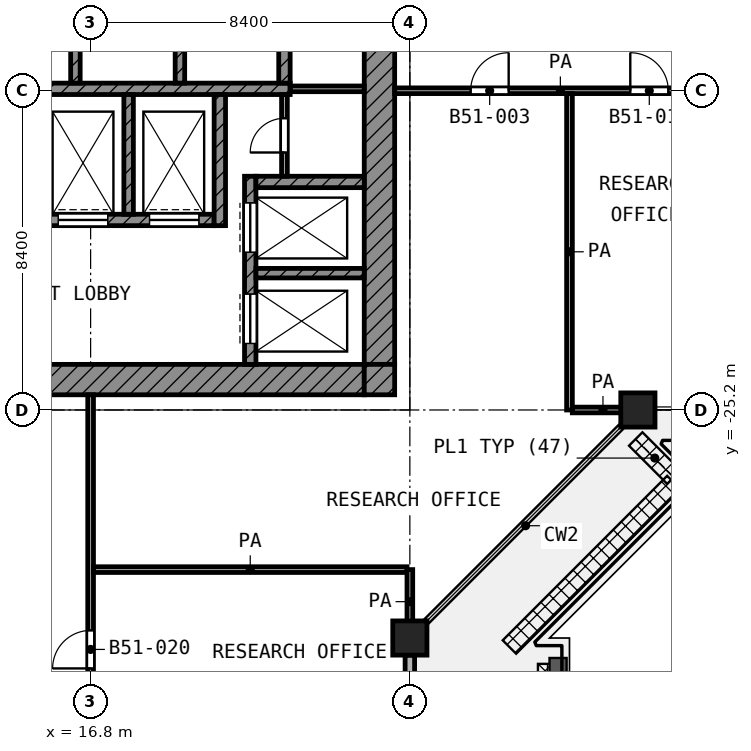
"""IFC4 building model, lengths in metres.
Left out: names, types, materials, properties, quantities, classifications, styles, units other than length and angle.
Written with IfcOpenShell. Run it as: python <this file> out.ifc"""

import sys

from ifc_helpers import new_model, si_unit, direction, frame, frame_2d, origin, origin_2d, place, context, subcontext, project, spatial, rectangle, extrude, element, fill, save


model = new_model("IFC4")
c1 = context("Model", 3, precision=1e-05, world=origin(), true_north=direction((0.0, 1.0)))
c2 = subcontext(c1, "Body", "Model", "MODEL_VIEW")
j1 = project(units=[si_unit("LENGTHUNIT", "METRE"), si_unit("PLANEANGLEUNIT", "RADIAN")], contexts=[c1])
p1 = place(None, origin())
s1 = spatial("IfcSite", under=j1, at=p1, CompositionType="ELEMENT")
p2 = place(p1, origin())
s2 = spatial("IfcBuilding", under=s1, at=p2, CompositionType="ELEMENT")
p3 = place(p2, frame((0.0, 0.0, 222.2)))
s3 = spatial("IfcBuildingStorey", under=s2, at=p3, CompositionType="ELEMENT", Elevation=222.2)
for number, where, z_axis, x_axis in (
    (1, (31.2, -25.2, 0.0), (0.0, 0.0, 1.0), (1.0, 0.0, 0.0)),
    (2, (25.2, -31.2, 0.0), (0.0, 0.0, 1.0), (1.0, 0.0, 0.0)),
):
    element("IfcColumn", number, at=place(p3, frame(where, z_axis=z_axis, x_axis=x_axis)), inside=s3, PredefinedType="COLUMN", context=c2, shape_type="SweptSolid", body=[
        extrude(rectangle(XDim=0.9, YDim=0.9, at=origin_2d()), origin(), (0.0, 0.0, 1.0), 4.2),
    ])
p4 = place(p3, frame((25.2, -35.725, 0.0), z_axis=(0.0, 0.0, 1.0), x_axis=(0.0, 1.0, 0.0)))
e3 = element("IfcWall", 3, at=p4, inside=s3, PredefinedType="SOLIDWALL", context=c2, shape_type="SweptSolid", body=[
    extrude(rectangle(XDim=4.075, YDim=0.25, at=frame_2d((2.038, 0.0))), origin(), (0.0, 0.0, 1.0), 2.58),
])
p5 = place(p4, frame((0.837, 0.0, 0.0)))
e4 = element("IfcOpeningElement", 4, at=p5, cuts=e3, PredefinedType="OPENING", context=c2, shape_type="SweptSolid", body=[
    extrude(rectangle(XDim=1.0, YDim=2.1, at=frame_2d((0.5, 1.05))), frame((0.0, 0.135, 0.0), z_axis=(0.0, -1.0, 0.0), x_axis=(1.0, 0.0, 0.0)), (0.0, 0.0, 1.0), 0.27),
])
p6 = place(p3, frame((24.4, -24.0, 0.0), z_axis=(0.0, 0.0, 1.0), x_axis=(0.0, 1.0, 0.0)))
e5 = element("IfcWall", 5, at=p6, inside=s3, PredefinedType="SHEAR", context=c2, shape_type="SweptSolid", body=[
    extrude(rectangle(XDim=18.6, YDim=0.8, at=frame_2d((9.3, 0.0))), origin(), (0.0, 0.0, 1.0), 3.6),
])
p7 = place(p6, frame((10.5, 0.0, 0.0)))
e6 = element("IfcOpeningElement", 6, at=p7, cuts=e5, PredefinedType="OPENING", context=c2, shape_type="SweptSolid", body=[
    extrude(rectangle(XDim=1.8, YDim=2.1, at=frame_2d((0.9, 1.05))), frame((0.0, 0.41, 0.0), z_axis=(0.0, -1.0, 0.0), x_axis=(1.0, 0.0, 0.0)), (0.0, 0.0, 1.0), 0.82),
])
p8 = place(p3, frame((5.4, -24.4, 0.0), z_axis=(0.0, 0.0, 1.0), x_axis=(1.0, 0.0, 0.0)))
e7 = element("IfcWall", 7, at=p8, inside=s3, PredefinedType="SHEAR", context=c2, shape_type="SweptSolid", body=[
    extrude(rectangle(XDim=18.6, YDim=0.8, at=frame_2d((9.3, 0.0))), origin(), (0.0, 0.0, 1.0), 3.6),
])
p9 = place(p8, frame((6.3, 0.0, 0.0)))
e8 = element("IfcOpeningElement", 8, at=p9, cuts=e7, PredefinedType="OPENING", context=c2, shape_type="SweptSolid", body=[
    extrude(rectangle(XDim=1.8, YDim=2.1, at=frame_2d((0.9, 1.05))), frame((0.0, 0.41, 0.0), z_axis=(0.0, -1.0, 0.0), x_axis=(1.0, 0.0, 0.0)), (0.0, 0.0, 1.0), 0.82),
])
p10 = place(p3, frame((24.4, -24.8, 0.0), z_axis=(0.0, 0.0, 1.0), x_axis=(0.0, 1.0, 0.0)))
e9 = element("IfcWall", 9, at=p10, inside=s3, PredefinedType="SHEAR", context=c2, shape_type="SweptSolid", body=[
    extrude(rectangle(XDim=0.8, YDim=0.8, at=frame_2d((0.4, 0.0))), origin(), (0.0, 0.0, 1.0), 3.6),
])
p11 = place(p3, frame((5.4, -16.75, 0.0), z_axis=(0.0, 0.0, 1.0), x_axis=(1.0, 0.0, 0.0)))
e10 = element("IfcWall", 10, at=p11, inside=s3, PredefinedType="SHEAR", context=c2, shape_type="SweptSolid", body=[
    extrude(rectangle(XDim=16.65, YDim=0.3, at=frame_2d((8.325, 0.0))), origin(), (0.0, 0.0, 1.0), 3.6),
])
p12 = place(p3, frame((5.4, -20.2, 0.0), z_axis=(0.0, 0.0, 1.0), x_axis=(1.0, 0.0, 0.0)))
e11 = element("IfcWall", 11, at=p12, inside=s3, PredefinedType="SHEAR", context=c2, shape_type="SweptSolid", body=[
    extrude(rectangle(XDim=14.65, YDim=0.3, at=frame_2d((7.325, 0.0))), origin(), (0.0, 0.0, 1.0), 3.6),
])
p13 = place(p12, frame((10.55, 0.0, 0.0)))
e12 = element("IfcOpeningElement", 12, at=p13, cuts=e11, PredefinedType="OPENING", context=c2, shape_type="SweptSolid", body=[
    extrude(rectangle(XDim=1.3, YDim=2.1, at=frame_2d((0.65, 1.05))), frame((0.0, 0.16, 0.0), z_axis=(0.0, -1.0, 0.0), x_axis=(1.0, 0.0, 0.0)), (0.0, 0.0, 1.0), 0.32),
])
p14 = place(p12, frame((12.95, 0.0, 0.0)))
e13 = element("IfcOpeningElement", 13, at=p14, cuts=e11, PredefinedType="OPENING", context=c2, shape_type="SweptSolid", body=[
    extrude(rectangle(XDim=1.3, YDim=2.1, at=frame_2d((0.65, 1.05))), frame((0.0, 0.16, 0.0), z_axis=(0.0, -1.0, 0.0), x_axis=(1.0, 0.0, 0.0)), (0.0, 0.0, 1.0), 0.32),
])
p15 = place(p12, frame((0.55, 0.0, 0.0)))
e14 = element("IfcOpeningElement", 14, at=p15, cuts=e11, PredefinedType="OPENING", context=c2, shape_type="SweptSolid", body=[
    extrude(rectangle(XDim=1.3, YDim=2.1, at=frame_2d((0.65, 1.05))), frame((0.0, 0.16, 0.0), z_axis=(0.0, -1.0, 0.0), x_axis=(1.0, 0.0, 0.0)), (0.0, 0.0, 1.0), 0.32),
])
p16 = place(p12, frame((2.95, 0.0, 0.0)))
e15 = element("IfcOpeningElement", 15, at=p16, cuts=e11, PredefinedType="OPENING", context=c2, shape_type="SweptSolid", body=[
    extrude(rectangle(XDim=1.3, YDim=2.1, at=frame_2d((0.65, 1.05))), frame((0.0, 0.16, 0.0), z_axis=(0.0, -1.0, 0.0), x_axis=(1.0, 0.0, 0.0)), (0.0, 0.0, 1.0), 0.32),
])
p17 = place(p12, frame((6.55, 0.0, 0.0)))
e16 = element("IfcOpeningElement", 16, at=p17, cuts=e11, PredefinedType="OPENING", context=c2, shape_type="SweptSolid", body=[
    extrude(rectangle(XDim=0.9, YDim=2.1, at=frame_2d((0.45, 1.05))), frame((0.0, 0.16, 0.0), z_axis=(0.0, -1.0, 0.0), x_axis=(1.0, 0.0, 0.0)), (0.0, 0.0, 1.0), 0.32),
])
p18 = place(p12, frame((8.95, 0.0, 0.0)))
e17 = element("IfcOpeningElement", 17, at=p18, cuts=e11, PredefinedType="OPENING", context=c2, shape_type="SweptSolid", body=[
    extrude(rectangle(XDim=0.9, YDim=2.1, at=frame_2d((0.45, 1.05))), frame((0.0, 0.16, 0.0), z_axis=(0.0, -1.0, 0.0), x_axis=(1.0, 0.0, 0.0)), (0.0, 0.0, 1.0), 0.32),
])
p19 = place(p3, frame((20.2, -20.35, 0.0), z_axis=(0.0, 0.0, 1.0), x_axis=(0.0, 1.0, 0.0)))
e18 = element("IfcWall", 18, at=p19, inside=s3, PredefinedType="SHEAR", context=c2, shape_type="SweptSolid", body=[
    extrude(rectangle(XDim=3.45, YDim=0.3, at=frame_2d((1.725, 0.0))), origin(), (0.0, 0.0, 1.0), 3.6),
])
p20 = place(p3, frame((21.9, -16.6, 0.0), z_axis=(0.0, 0.0, 1.0), x_axis=(0.0, 1.0, 0.0)))
e19 = element("IfcWall", 19, at=p20, inside=s3, PredefinedType="SHEAR", context=c2, shape_type="SweptSolid", body=[
    extrude(rectangle(XDim=2.35, YDim=0.3, at=frame_2d((1.175, 0.0))), origin(), (0.0, 0.0, 1.0), 3.6),
])
p21 = place(p3, frame((21.15, -19.2, 0.0), z_axis=(0.0, 0.0, 1.0), x_axis=(1.0, 0.0, 0.0)))
e20 = element("IfcWall", 20, at=p21, inside=s3, PredefinedType="SHEAR", context=c2, shape_type="SweptSolid", body=[
    extrude(rectangle(XDim=2.85, YDim=0.3, at=frame_2d((1.425, 0.0))), origin(), (0.0, 0.0, 1.0), 3.6),
])
p22 = place(p3, frame((21.0, -24.0, 0.0), z_axis=(0.0, 0.0, 1.0), x_axis=(0.0, 1.0, 0.0)))
e21 = element("IfcWall", 21, at=p22, inside=s3, PredefinedType="SHEAR", context=c2, shape_type="SweptSolid", body=[
    extrude(rectangle(XDim=4.95, YDim=0.3, at=frame_2d((2.475, 0.0))), origin(), (0.0, 0.0, 1.0), 3.6),
])
p23 = place(p22, frame((2.95, 0.0, 0.0)))
e22 = element("IfcOpeningElement", 22, at=p23, cuts=e21, PredefinedType="OPENING", context=c2, shape_type="SweptSolid", body=[
    extrude(rectangle(XDim=1.3, YDim=2.1, at=frame_2d((0.65, 1.05))), frame((0.0, 0.16, 0.0), z_axis=(0.0, -1.0, 0.0), x_axis=(1.0, 0.0, 0.0)), (0.0, 0.0, 1.0), 0.32),
])
p24 = place(p22, frame((0.55, 0.0, 0.0)))
e23 = element("IfcOpeningElement", 23, at=p24, cuts=e21, PredefinedType="OPENING", context=c2, shape_type="SweptSolid", body=[
    extrude(rectangle(XDim=1.3, YDim=2.1, at=frame_2d((0.65, 1.05))), frame((0.0, 0.16, 0.0), z_axis=(0.0, -1.0, 0.0), x_axis=(1.0, 0.0, 0.0)), (0.0, 0.0, 1.0), 0.32),
])
p25 = place(p3, frame((21.15, -21.6, 0.0), z_axis=(0.0, 0.0, 1.0), x_axis=(1.0, 0.0, 0.0)))
e24 = element("IfcWall", 24, at=p25, inside=s3, PredefinedType="SHEAR", context=c2, shape_type="SweptSolid", body=[
    extrude(rectangle(XDim=2.85, YDim=0.25, at=frame_2d((1.425, 0.0))), origin(), (0.0, 0.0, 1.0), 3.6),
])
p26 = place(p3, frame((17.8, -20.05, 0.0), z_axis=(0.0, 0.0, 1.0), x_axis=(0.0, 1.0, 0.0)))
e25 = element("IfcWall", 25, at=p26, inside=s3, PredefinedType="SHEAR", context=c2, shape_type="SweptSolid", body=[
    extrude(rectangle(XDim=3.15, YDim=0.25, at=frame_2d((1.575, 0.0))), origin(), (0.0, 0.0, 1.0), 3.6),
])
for number, where, z_axis, x_axis in (
    (26, (16.4, -16.6, 0.0), (0.0, 0.0, 1.0), (0.0, 1.0, 0.0)),
    (27, (19.15, -16.6, 0.0), (0.0, 0.0, 1.0), (0.0, 1.0, 0.0)),
):
    element("IfcWall", number, at=place(p3, frame(where, z_axis=z_axis, x_axis=x_axis)), inside=s3, PredefinedType="SHEAR", context=c2, shape_type="SweptSolid", body=[
        extrude(rectangle(XDim=2.35, YDim=0.25, at=frame_2d((1.175, 0.0))), origin(), (0.0, 0.0, 1.0), 3.6),
    ])
p27 = place(p3, frame((21.9, -19.05, 0.0), z_axis=(0.0, 0.0, 1.0), x_axis=(0.0, 1.0, 0.0)))
e28 = element("IfcWall", 28, at=p27, inside=s3, PredefinedType="PARTITIONING", context=c2, shape_type="SweptSolid", body=[
    extrude(rectangle(XDim=2.15, YDim=0.15, at=frame_2d((1.075, 0.0))), origin(), (0.0, 0.0, 1.0), 3.6),
])
p28 = place(p27, frame((0.625, 0.0, 0.0)))
e29 = element("IfcOpeningElement", 29, at=p28, cuts=e28, PredefinedType="OPENING", context=c2, shape_type="SweptSolid", body=[
    extrude(rectangle(XDim=0.9, YDim=2.1, at=frame_2d((0.45, 1.05))), frame((0.0, 0.085, 0.0), z_axis=(0.0, -1.0, 0.0), x_axis=(1.0, 0.0, 0.0)), (0.0, 0.0, 1.0), 0.17),
])
p29 = place(p3, frame((22.05, -16.75, 0.0), z_axis=(0.0, 0.0, 1.0), x_axis=(1.0, 0.0, 0.0)))
e30 = element("IfcWall", 30, at=p29, inside=s3, PredefinedType="PARTITIONING", context=c2, shape_type="SweptSolid", body=[
    extrude(rectangle(XDim=1.95, YDim=0.15, at=frame_2d((0.975, 0.0))), origin(), (0.0, 0.0, 1.0), 3.6),
])
p30 = place(p3, frame((16.875, -29.4, 0.0), z_axis=(0.0, 0.0, 1.0), x_axis=(1.0, 0.0, 0.0)))
e31 = element("IfcWall", 31, at=p30, inside=s3, PredefinedType="PARTITIONING", context=c2, shape_type="SweptSolid", body=[
    extrude(rectangle(XDim=8.25, YDim=0.15, at=frame_2d((4.125, 0.0))), origin(), (0.0, 0.0, 1.0), 3.6),
])
p31 = place(p3, frame((29.475, -25.2, 0.0), z_axis=(0.0, 0.0, 1.0), x_axis=(1.0, 0.0, 0.0)))
e32 = element("IfcWall", 32, at=p31, inside=s3, PredefinedType="PARTITIONING", context=c2, shape_type="SweptSolid", body=[
    extrude(rectangle(XDim=1.612, YDim=0.15, at=frame_2d((0.806, 0.0))), origin(), (0.0, 0.0, 1.0), 3.6),
])
p32 = place(p3, frame((24.8, -16.8, 0.0), z_axis=(0.0, 0.0, 1.0), x_axis=(1.0, 0.0, 0.0)))
e33 = element("IfcWall", 33, at=p32, inside=s3, PredefinedType="PARTITIONING", context=c2, shape_type="SweptSolid", body=[
    extrude(rectangle(XDim=8.72, YDim=0.15, at=frame_2d((4.36, 0.0))), origin(), (0.0, 0.0, 1.0), 3.6),
])
p33 = place(p32, frame((2.0, 0.0, 0.0)))
e34 = element("IfcOpeningElement", 34, at=p33, cuts=e33, PredefinedType="OPENING", context=c2, shape_type="SweptSolid", body=[
    extrude(rectangle(XDim=1.0, YDim=2.1, at=frame_2d((0.5, 1.05))), frame((0.0, 0.085, 0.0), z_axis=(0.0, -1.0, 0.0), x_axis=(1.0, 0.0, 0.0)), (0.0, 0.0, 1.0), 0.17),
])
p34 = place(p32, frame((6.2, 0.0, 0.0)))
e35 = element("IfcOpeningElement", 35, at=p34, cuts=e33, PredefinedType="OPENING", context=c2, shape_type="SweptSolid", body=[
    extrude(rectangle(XDim=1.0, YDim=2.1, at=frame_2d((0.5, 1.05))), frame((0.0, 0.085, 0.0), z_axis=(0.0, -1.0, 0.0), x_axis=(1.0, 0.0, 0.0)), (0.0, 0.0, 1.0), 0.17),
])
p35 = place(p3, frame((16.8, -46.12, 0.0), z_axis=(0.0, 0.0, 1.0), x_axis=(0.0, 1.0, 0.0)))
e36 = element("IfcWall", 36, at=p35, inside=s3, PredefinedType="PARTITIONING", context=c2, shape_type="SweptSolid", body=[
    extrude(rectangle(XDim=21.32, YDim=0.15, at=frame_2d((10.66, 0.0))), origin(), (0.0, 0.0, 1.0), 3.6),
])
p36 = place(p35, frame((14.12, 0.0, 0.0)))
e37 = element("IfcOpeningElement", 37, at=p36, cuts=e36, PredefinedType="OPENING", context=c2, shape_type="SweptSolid", body=[
    extrude(rectangle(XDim=1.0, YDim=2.1, at=frame_2d((0.5, 1.05))), frame((0.0, 0.085, 0.0), z_axis=(0.0, -1.0, 0.0), x_axis=(1.0, 0.0, 0.0)), (0.0, 0.0, 1.0), 0.17),
])
p37 = place(p35, frame((9.92, 0.0, 0.0)))
e38 = element("IfcOpeningElement", 38, at=p37, cuts=e36, PredefinedType="OPENING", context=c2, shape_type="SweptSolid", body=[
    extrude(rectangle(XDim=1.0, YDim=2.1, at=frame_2d((0.5, 1.05))), frame((0.0, 0.085, 0.0), z_axis=(0.0, -1.0, 0.0), x_axis=(1.0, 0.0, 0.0)), (0.0, 0.0, 1.0), 0.17),
])
p38 = place(p35, frame((5.02, 0.0, 0.0)))
e39 = element("IfcOpeningElement", 39, at=p38, cuts=e36, PredefinedType="OPENING", context=c2, shape_type="SweptSolid", body=[
    extrude(rectangle(XDim=1.0, YDim=2.1, at=frame_2d((0.5, 1.05))), frame((0.0, 0.085, 0.0), z_axis=(0.0, -1.0, 0.0), x_axis=(1.0, 0.0, 0.0)), (0.0, 0.0, 1.0), 0.17),
])
p39 = place(p35, frame((2.22, 0.0, 0.0)))
e40 = element("IfcOpeningElement", 40, at=p39, cuts=e36, PredefinedType="OPENING", context=c2, shape_type="SweptSolid", body=[
    extrude(rectangle(XDim=1.0, YDim=2.1, at=frame_2d((0.5, 1.05))), frame((0.0, 0.085, 0.0), z_axis=(0.0, -1.0, 0.0), x_axis=(1.0, 0.0, 0.0)), (0.0, 0.0, 1.0), 0.17),
])
p40 = place(p3, frame((25.2, -31.087, 0.0), z_axis=(0.0, 0.0, 1.0), x_axis=(0.0, 1.0, 0.0)))
e41 = element("IfcWall", 41, at=p40, inside=s3, PredefinedType="PARTITIONING", context=c2, shape_type="SweptSolid", body=[
    extrude(rectangle(XDim=1.687, YDim=0.15, at=frame_2d((0.844, 0.0))), origin(), (0.0, 0.0, 1.0), 3.6),
])
p41 = place(p3, frame((29.4, -25.2, 0.0), z_axis=(0.0, 0.0, 1.0), x_axis=(0.0, 1.0, 0.0)))
e42 = element("IfcWall", 42, at=p41, inside=s3, PredefinedType="PARTITIONING", context=c2, shape_type="SweptSolid", body=[
    extrude(rectangle(XDim=8.325, YDim=0.15, at=frame_2d((4.163, 0.0))), origin(), (0.0, 0.0, 1.0), 3.6),
])
p42 = place(p23, origin())
e43 = element("IfcDoor", 43, at=p42, inside=s3, OperationType="DOUBLE_DOOR_SLIDING", PredefinedType="DOOR", context=c2, shape_type="SweptSolid", body=[
    extrude(rectangle(XDim=1.3, YDim=2.1, at=frame_2d((0.65, 1.05))), frame((0.0, 0.025, 0.0), z_axis=(0.0, -1.0, 0.0), x_axis=(1.0, 0.0, 0.0)), (0.0, 0.0, 1.0), 0.05),
])
fill(e22, e43)
p43 = place(p24, origin())
e44 = element("IfcDoor", 44, at=p43, inside=s3, OperationType="DOUBLE_DOOR_SLIDING", PredefinedType="DOOR", context=c2, shape_type="SweptSolid", body=[
    extrude(rectangle(XDim=1.3, YDim=2.1, at=frame_2d((0.65, 1.05))), frame((0.0, 0.025, 0.0), z_axis=(0.0, -1.0, 0.0), x_axis=(1.0, 0.0, 0.0)), (0.0, 0.0, 1.0), 0.05),
])
fill(e23, e44)
p44 = place(p13, origin())
e45 = element("IfcDoor", 45, at=p44, inside=s3, OperationType="DOUBLE_DOOR_SLIDING", PredefinedType="DOOR", context=c2, shape_type="SweptSolid", body=[
    extrude(rectangle(XDim=1.3, YDim=2.1, at=frame_2d((0.65, 1.05))), frame((0.0, 0.025, 0.0), z_axis=(0.0, -1.0, 0.0), x_axis=(1.0, 0.0, 0.0)), (0.0, 0.0, 1.0), 0.05),
])
fill(e12, e45)
p45 = place(p14, origin())
e46 = element("IfcDoor", 46, at=p45, inside=s3, OperationType="DOUBLE_DOOR_SLIDING", PredefinedType="DOOR", context=c2, shape_type="SweptSolid", body=[
    extrude(rectangle(XDim=1.3, YDim=2.1, at=frame_2d((0.65, 1.05))), frame((0.0, 0.025, 0.0), z_axis=(0.0, -1.0, 0.0), x_axis=(1.0, 0.0, 0.0)), (0.0, 0.0, 1.0), 0.05),
])
fill(e13, e46)
p46 = place(p28, origin())
e47 = element("IfcDoor", 47, at=p46, inside=s3, OperationType="SINGLE_SWING_LEFT", PredefinedType="DOOR", context=c2, shape_type="SweptSolid", body=[
    extrude(rectangle(XDim=0.9, YDim=2.1, at=frame_2d((0.45, 1.05))), frame((0.0, 0.025, 0.0), z_axis=(0.0, -1.0, 0.0), x_axis=(1.0, 0.0, 0.0)), (0.0, 0.0, 1.0), 0.05),
])
fill(e29, e47)
p47 = place(p33, origin())
e48 = element("IfcDoor", 48, at=p47, inside=s3, OperationType="SINGLE_SWING_RIGHT", PredefinedType="DOOR", context=c2, shape_type="SweptSolid", body=[
    extrude(rectangle(XDim=1.0, YDim=2.1, at=frame_2d((0.5, 1.05))), frame((0.0, 0.025, 0.0), z_axis=(0.0, -1.0, 0.0), x_axis=(1.0, 0.0, 0.0)), (0.0, 0.0, 1.0), 0.05),
])
fill(e34, e48)
p48 = place(p34, origin())
e49 = element("IfcDoor", 49, at=p48, inside=s3, OperationType="SINGLE_SWING_LEFT", PredefinedType="DOOR", context=c2, shape_type="SweptSolid", body=[
    extrude(rectangle(XDim=1.0, YDim=2.1, at=frame_2d((0.5, 1.05))), frame((0.0, 0.025, 0.0), z_axis=(0.0, -1.0, 0.0), x_axis=(1.0, 0.0, 0.0)), (0.0, 0.0, 1.0), 0.05),
])
fill(e35, e49)
p49 = place(p36, origin())
e50 = element("IfcDoor", 50, at=p49, inside=s3, OperationType="SINGLE_SWING_LEFT", PredefinedType="DOOR", context=c2, shape_type="SweptSolid", body=[
    extrude(rectangle(XDim=1.0, YDim=2.1, at=frame_2d((0.5, 1.05))), frame((0.0, 0.025, 0.0), z_axis=(0.0, -1.0, 0.0), x_axis=(1.0, 0.0, 0.0)), (0.0, 0.0, 1.0), 0.05),
])
fill(e37, e50)
save(model, sys.argv[1])
